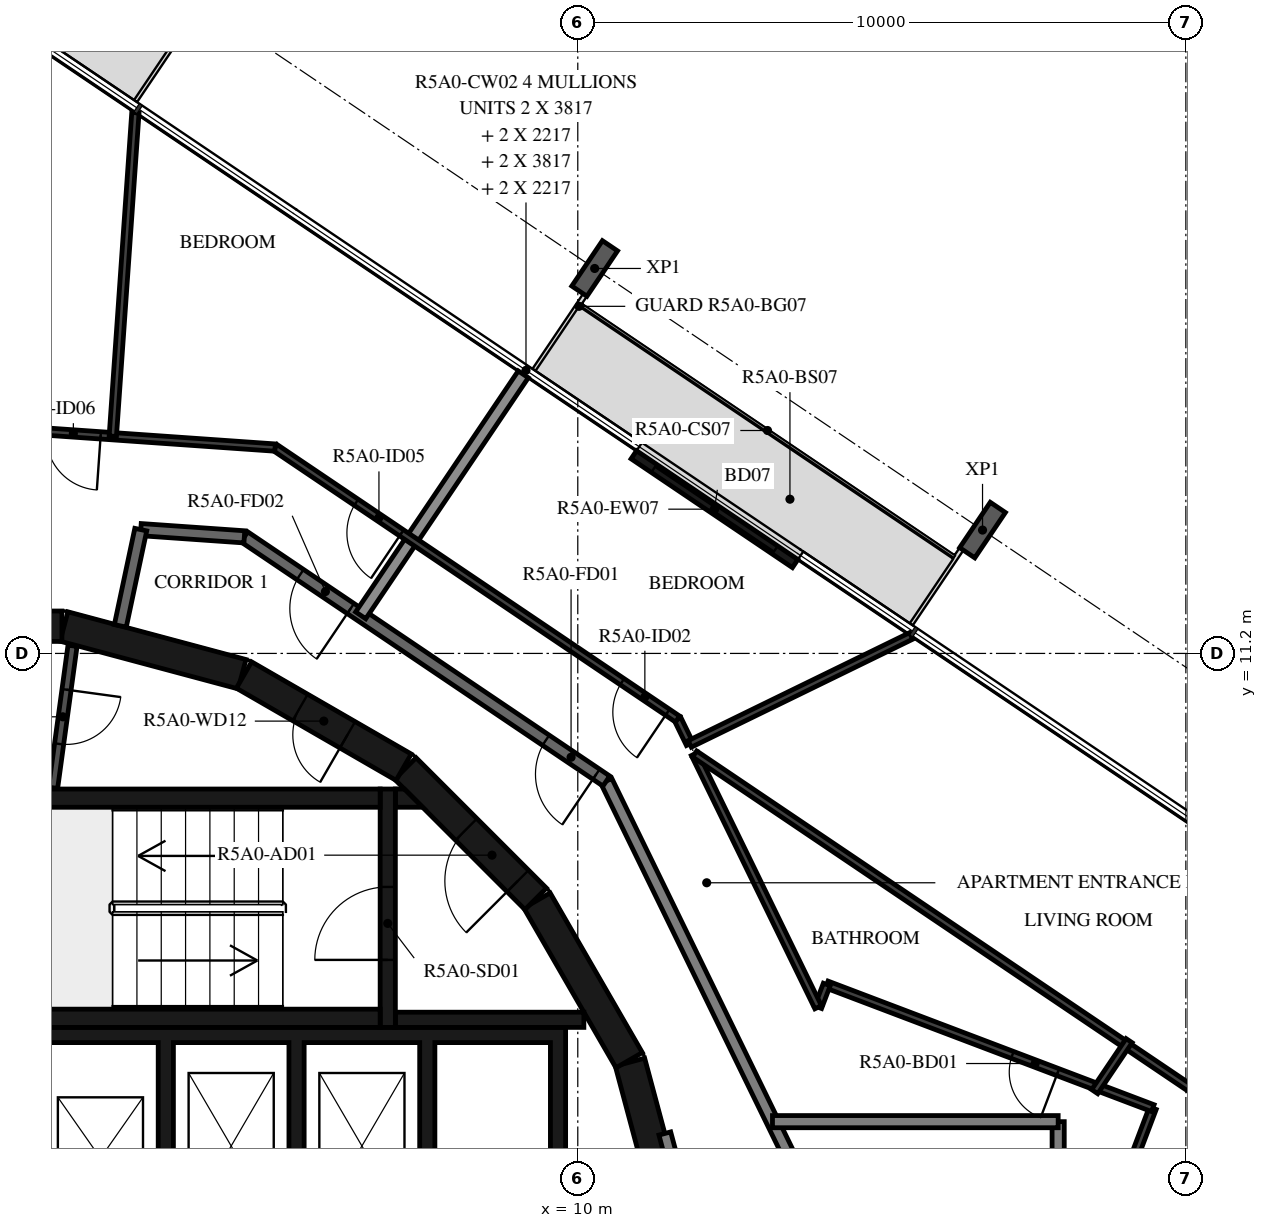
"""IFC4 building model, lengths in metres.
Left out: names, types, materials, properties, quantities, classifications, styles, units other than length and angle.
Written with IfcOpenShell. Run it as: python <this file> out.ifc"""

import sys

from ifc_helpers import new_model, si_unit, direction, frame, frame_2d, origin, origin_2d, place, context, subcontext, project, spatial, polyline, rectangle, i_section, outline, extrude, element, fill, save


model = new_model("IFC4")
c1 = context("Model", 3, precision=1e-05, world=origin(), true_north=direction((0.0, 1.0)))
c2 = subcontext(c1, "Body", "Model", "MODEL_VIEW")
j1 = project(units=[si_unit("LENGTHUNIT", "METRE"), si_unit("PLANEANGLEUNIT", "RADIAN")], contexts=[c1])
p1 = place(None, origin())
s1 = spatial("IfcSite", under=j1, at=p1, CompositionType="ELEMENT")
p2 = place(p1, origin())
s2 = spatial("IfcBuilding", under=s1, at=p2, CompositionType="ELEMENT")
p3 = place(p2, frame((0.0, 0.0, 195.4)))
s3 = spatial("IfcBuildingStorey", under=s2, at=p3, CompositionType="ELEMENT", Elevation=195.4)
for number, where, z_axis, x_axis in (
    (1, (16.656, 13.228, -0.38), (0.0, 0.0, 1.0), (0.829, -0.559, 0.0)),
    (2, (10.278, 17.531, -0.38), (0.0, 0.0, 1.0), (0.829, -0.559, 0.0)),
):
    element("IfcColumn", number, at=place(p3, frame(where, z_axis=z_axis, x_axis=x_axis)), inside=s3, PredefinedType="COLUMN", context=c2, shape_type="SweptSolid", body=[
        extrude(i_section(OverallWidth=0.3, OverallDepth=0.9, WebThickness=0.019, FlangeThickness=0.035, FilletRadius=0.03, at=origin_2d()), origin(), (0.0, 0.0, 1.0), 3.5),
    ])
p4 = place(p3, frame((13.574, 12.677, 0.0), z_axis=(0.0, 0.0, 1.0), x_axis=(-0.829068838882, 0.55914654644, 0.0)))
e3 = element("IfcWall", 3, at=p4, inside=s3, PredefinedType="STANDARD", context=c2, shape_type="SweptSolid", body=[
    extrude(rectangle(XDim=3.2, YDim=0.16, at=frame_2d((1.6, 0.0))), origin(), (0.0, 0.0, 1.0), 3.12),
])
p5 = place(p4, frame((0.4, 0.0, 0.0)))
e4 = element("IfcOpeningElement", 4, at=p5, cuts=e3, PredefinedType="OPENING", context=c2, shape_type="SweptSolid", body=[
    extrude(rectangle(XDim=2.4, YDim=2.4, at=frame_2d((1.2, 1.2))), frame((0.0, 0.09, 0.0), z_axis=(0.0, -1.0, 0.0), x_axis=(1.0, 0.0, 0.0)), (0.0, 0.0, 1.0), 0.18),
])
for number, where, z_axis, x_axis in (
    (5, (11.643, 1.55, 0.0), (0.0, 0.0, 1.0), (-0.259, 0.966, 0.0)),
    (6, (10.845, 4.51, 0.0), (0.0, 0.0, 1.0), (-0.5, 0.866, 0.0)),
):
    element("IfcWall", number, at=place(p3, frame(where, z_axis=z_axis, x_axis=x_axis)), inside=s3, PredefinedType="SHEAR", context=c2, shape_type="SweptSolid", body=[
        extrude(rectangle(XDim=3.033, YDim=0.5, at=frame_2d((1.516, 0.0))), origin(), (0.0, 0.0, 1.0), 3.12),
    ])
p6 = place(p3, frame((9.308, 7.164, 0.0), z_axis=(0.0, 0.0, 1.0), x_axis=(-0.707106781187, 0.707106781187, 0.0)))
e7 = element("IfcWall", 7, at=p6, inside=s3, PredefinedType="SHEAR", context=c2, shape_type="SweptSolid", body=[
    extrude(rectangle(XDim=3.032, YDim=0.5, at=frame_2d((1.516, 0.0))), origin(), (0.0, 0.0, 1.0), 3.12),
])
p7 = place(p6, frame((0.416, 0.0, 0.0)))
e8 = element("IfcOpeningElement", 8, at=p7, cuts=e7, PredefinedType="OPENING", context=c2, shape_type="SweptSolid", body=[
    extrude(rectangle(XDim=1.2, YDim=2.1, at=frame_2d((0.6, 1.05))), frame((0.0, 0.26, 0.0), z_axis=(0.0, -1.0, 0.0), x_axis=(1.0, 0.0, 0.0)), (0.0, 0.0, 1.0), 0.52),
])
p8 = place(p3, frame((7.137, 9.329, 0.0), z_axis=(0.0, 0.0, 1.0), x_axis=(-0.865975092491, 0.500087131594, 0.0)))
e9 = element("IfcWall", 9, at=p8, inside=s3, PredefinedType="SHEAR", context=c2, shape_type="SweptSolid", body=[
    extrude(rectangle(XDim=3.033, YDim=0.5, at=frame_2d((1.516, 0.0))), origin(), (0.0, 0.0, 1.0), 3.12),
])
p9 = place(p8, frame((1.066, 0.0, 0.0)))
e10 = element("IfcOpeningElement", 10, at=p9, cuts=e9, PredefinedType="OPENING", context=c2, shape_type="SweptSolid", body=[
    extrude(rectangle(XDim=0.9, YDim=2.1, at=frame_2d((0.45, 1.05))), frame((0.0, 0.26, 0.0), z_axis=(0.0, -1.0, 0.0), x_axis=(1.0, 0.0, 0.0)), (0.0, 0.0, 1.0), 0.52),
])
for number, where, z_axis, x_axis in (
    (11, (4.479, 10.858, 0.0), (0.0, 0.0, 1.0), (-0.966, 0.259, 0.0)),
    (12, (1.516, 11.647, 0.0), (0.0, 0.0, 1.0), (-1.0, 0.0, 0.0)),
):
    element("IfcWall", number, at=place(p3, frame(where, z_axis=z_axis, x_axis=x_axis)), inside=s3, PredefinedType="SHEAR", context=c2, shape_type="SweptSolid", body=[
        extrude(rectangle(XDim=3.033, YDim=0.5, at=frame_2d((1.516, 0.0))), origin(), (0.0, 0.0, 1.0), 3.12),
    ])
for number, where, z_axis, x_axis in (
    (13, (0.0, 5.2, 0.0), (0.0, 0.0, 1.0), (1.0, 0.0, 0.0)),
    (14, (0.0, 8.82, 0.0), (0.0, 0.0, 1.0), (1.0, 0.0, 0.0)),
):
    element("IfcWall", number, at=place(p3, frame(where, z_axis=z_axis, x_axis=x_axis)), inside=s3, PredefinedType="SHEAR", context=c2, shape_type="SweptSolid", body=[
        extrude(rectangle(XDim=6.75, YDim=0.3, at=frame_2d((3.375, 0.0))), origin(), (0.0, 0.0, 1.0), 3.12),
    ])
p10 = place(p3, frame((6.875, 5.05, 0.0), z_axis=(0.0, 0.0, 1.0), x_axis=(0.0, 1.0, 0.0)))
e15 = element("IfcWall", 15, at=p10, inside=s3, PredefinedType="SHEAR", context=c2, shape_type="SweptSolid", body=[
    extrude(rectangle(XDim=3.92, YDim=0.25, at=frame_2d((1.96, 0.0))), origin(), (0.0, 0.0, 1.0), 3.12),
])
p11 = place(p10, frame((1.11, 0.0, 0.0)))
e16 = element("IfcOpeningElement", 16, at=p11, cuts=e15, PredefinedType="OPENING", context=c2, shape_type="SweptSolid", body=[
    extrude(rectangle(XDim=1.2, YDim=2.1, at=frame_2d((0.6, 1.05))), frame((0.0, 0.135, 0.0), z_axis=(0.0, -1.0, 0.0), x_axis=(1.0, 0.0, 0.0)), (0.0, 0.0, 1.0), 0.27),
])
p12 = place(p3, frame((7.0, 5.175, 0.0), z_axis=(0.0, 0.0, 1.0), x_axis=(1.0, 0.0, 0.0)))
e17 = element("IfcWall", 17, at=p12, inside=s3, PredefinedType="SHEAR", context=c2, shape_type="SweptSolid", body=[
    extrude(rectangle(XDim=3.1, YDim=0.25, at=frame_2d((1.55, 0.0))), origin(), (0.0, 0.0, 1.0), 3.12),
])
p13 = place(p3, origin())
e18 = element("IfcWall", 18, at=p13, inside=s3, PredefinedType="SHEAR", context=c2, shape_type="SweptSolid", body=[
    extrude(outline(polyline([(7.448, 8.67), (7.0, 8.67), (7.0, 8.97), (7.148, 8.97), (7.448, 8.67)])), origin(), (0.0, 0.0, 1.0), 3.12),
])
p14 = place(p3, origin())
e19 = element("IfcWall", 19, at=p14, inside=s3, PredefinedType="SHEAR", context=c2, shape_type="SweptSolid", body=[
    extrude(outline(polyline([(-9.55, 4.8), (-5.5, 4.8), (-5.5, 1.9), (-5.25, 1.9), (-5.25, 4.8), (-1.2, 4.8), (-1.2, 1.9), (-0.95, 1.9), (-0.95, 4.8), (0.95, 4.8), (0.95, 1.9), (1.2, 1.9), (1.2, 4.8), (3.1, 4.8), (3.1, 1.9), (3.35, 1.9), (3.35, 4.8), (5.25, 4.8), (5.25, 1.9), (5.5, 1.9), (5.5, 4.8), (7.4, 4.8), (7.4, 1.9), (7.65, 1.9), (7.65, 4.8), (9.55, 4.8), (9.55, 1.9), (9.8, 1.9), (9.8, 4.8), (9.8, 5.05), (-9.8, 5.05), (-9.8, 4.8), (-9.8, 1.9), (-9.55, 1.9), (-9.55, 4.8)])), origin(), (0.0, 0.0, 1.0), 3.12),
])
p15 = place(p3, frame((1.691, 11.326, 0.0), z_axis=(0.0, 0.0, 1.0), x_axis=(-0.135344253201, -0.990798633994, 0.0)))
e20 = element("IfcWall", 20, at=p15, inside=s3, PredefinedType="PARTITIONING", context=c2, shape_type="SweptSolid", body=[
    extrude(rectangle(XDim=2.358, YDim=0.15, at=frame_2d((1.179, 0.0))), origin(), (0.0, 0.0, 1.0), 3.12),
])
p16 = place(p15, frame((0.729, 0.0, 0.0)))
e21 = element("IfcOpeningElement", 21, at=p16, cuts=e20, PredefinedType="OPENING", context=c2, shape_type="SweptSolid", body=[
    extrude(rectangle(XDim=0.9, YDim=2.1, at=frame_2d((0.45, 1.05))), frame((0.0, 0.085, 0.0), z_axis=(0.0, -1.0, 0.0), x_axis=(1.0, 0.0, 0.0)), (0.0, 0.0, 1.0), 0.17),
])
p17 = place(p3, frame((11.87, 1.668, 0.0), z_axis=(0.0, 0.0, 1.0), x_axis=(-0.258836880648, 0.965921047093, 0.0)))
e22 = element("IfcWall", 22, at=p17, inside=s3, PredefinedType="STANDARD", context=c2, shape_type="SweptSolid", body=[
    extrude(rectangle(XDim=1.695, YDim=0.2, at=frame_2d((0.848, 0.0))), origin(), (0.0, 0.0, 1.0), 3.12),
])
p18 = place(p3, frame((13.618, 2.647, 0.0), z_axis=(0.0, 0.0, 1.0), x_axis=(-0.438366026218, 0.898796543751, 0.0)))
e23 = element("IfcWall", 23, at=p18, inside=s3, PredefinedType="STANDARD", context=c2, shape_type="SweptSolid", body=[
    extrude(rectangle(XDim=7.181, YDim=0.2, at=frame_2d((3.591, 0.0))), origin(), (0.0, 0.0, 1.0), 3.12),
])
p19 = place(p3, frame((10.47, 9.101, 0.0), z_axis=(0.0, 0.0, 1.0), x_axis=(-0.829035841718, 0.559195469534, 0.0)))
e24 = element("IfcWall", 24, at=p19, inside=s3, PredefinedType="STANDARD", context=c2, shape_type="SweptSolid", body=[
    extrude(rectangle(XDim=7.181, YDim=0.2, at=frame_2d((3.591, 0.0))), origin(), (0.0, 0.0, 1.0), 3.12),
])
p20 = place(p19, frame((0.2, 0.0, 0.0)))
e25 = element("IfcOpeningElement", 25, at=p20, cuts=e24, PredefinedType="OPENING", context=c2, shape_type="SweptSolid", body=[
    extrude(rectangle(XDim=1.0, YDim=2.1, at=frame_2d((0.5, 1.05))), frame((0.0, 0.11, 0.0), z_axis=(0.0, -1.0, 0.0), x_axis=(1.0, 0.0, 0.0)), (0.0, 0.0, 1.0), 0.22),
])
p21 = place(p19, frame((5.073, 0.0, 0.0)))
e26 = element("IfcOpeningElement", 26, at=p21, cuts=e24, PredefinedType="OPENING", context=c2, shape_type="SweptSolid", body=[
    extrude(rectangle(XDim=1.0, YDim=2.1, at=frame_2d((0.5, 1.05))), frame((0.0, 0.11, 0.0), z_axis=(0.0, -1.0, 0.0), x_axis=(1.0, 0.0, 0.0)), (0.0, 0.0, 1.0), 0.22),
])
p22 = place(p3, frame((4.517, 13.117, 0.0), z_axis=(0.0, 0.0, 1.0), x_axis=(-0.997562153664, 0.069783591025, 0.0)))
e27 = element("IfcWall", 27, at=p22, inside=s3, PredefinedType="STANDARD", context=c2, shape_type="SweptSolid", body=[
    extrude(rectangle(XDim=1.707, YDim=0.2, at=frame_2d((0.854, 0.0))), origin(), (0.0, 0.0, 1.0), 3.12),
])
p23 = place(p3, frame((2.813, 13.236, 0.0), z_axis=(0.0, 0.0, 1.0), x_axis=(-0.207911086063, -0.978147729278, 0.0)))
e28 = element("IfcWall", 28, at=p23, inside=s3, PredefinedType="STANDARD", context=c2, shape_type="SweptSolid", body=[
    extrude(rectangle(XDim=1.618, YDim=0.2, at=frame_2d((0.809, 0.0))), origin(), (0.0, 0.0, 1.0), 3.12),
])
p24 = place(p3, frame((17.9, -3.5, 0.0), z_axis=(0.0, 0.0, 1.0), x_axis=(0.0, 1.0, 0.0)))
e29 = element("IfcWall", 29, at=p24, inside=s3, PredefinedType="STANDARD", context=c2, shape_type="SweptSolid", body=[
    extrude(rectangle(XDim=7.0, YDim=0.2, at=frame_2d((3.5, 0.0))), origin(), (0.0, 0.0, 1.0), 3.12),
])
p25 = place(p3, frame((17.9, 3.5, 0.0), z_axis=(0.0, 0.0, 1.0), x_axis=(-1.0, 0.0, 0.0)))
e30 = element("IfcWall", 30, at=p25, inside=s3, PredefinedType="STANDARD", context=c2, shape_type="SweptSolid", body=[
    extrude(rectangle(XDim=4.698, YDim=0.2, at=frame_2d((2.349, 0.0))), origin(), (0.0, 0.0, 1.0), 3.12),
])
p26 = place(p3, frame((9.104, 15.79, 0.0), z_axis=(0.0, 0.0, 1.0), x_axis=(-0.559193912135, -0.829036892201, 0.0)))
e31 = element("IfcWall", 31, at=p26, inside=s3, PredefinedType="STANDARD", context=c2, shape_type="SweptSolid", body=[
    extrude(rectangle(XDim=4.781, YDim=0.2, at=frame_2d((2.39, 0.0))), origin(), (0.0, 0.0, 1.0), 2.73),
])
p27 = place(p3, frame((18.286, 0.637, 0.0), z_axis=(0.0, 0.0, 1.0), x_axis=(0.354672075988, 0.934990758518, 0.0)))
e32 = element("IfcWall", 32, at=p27, inside=s3, PredefinedType="PARTITIONING", context=c2, shape_type="SweptSolid", body=[
    extrude(rectangle(XDim=3.3, YDim=0.12, at=frame_2d((1.65, 0.0))), origin(), (0.0, 0.0, 1.0), 3.12),
])
p28 = place(p27, frame((1.2, 0.0, 0.0)))
e33 = element("IfcOpeningElement", 33, at=p28, cuts=e32, PredefinedType="OPENING", context=c2, shape_type="SweptSolid", body=[
    extrude(rectangle(XDim=0.9, YDim=2.1, at=frame_2d((0.45, 1.05))), frame((0.0, 0.07, 0.0), z_axis=(0.0, -1.0, 0.0), x_axis=(1.0, 0.0, 0.0)), (0.0, 0.0, 1.0), 0.14),
])
p29 = place(p3, frame((19.456, 3.722, 0.0), z_axis=(0.0, 0.0, 1.0), x_axis=(-0.935017484321, 0.3546016131, 0.0)))
e34 = element("IfcWall", 34, at=p29, inside=s3, PredefinedType="PARTITIONING", context=c2, shape_type="SweptSolid", body=[
    extrude(rectangle(XDim=5.734, YDim=0.12, at=frame_2d((2.867, 0.0))), origin(), (0.0, 0.0, 1.0), 3.12),
])
p30 = place(p29, frame((1.669, 0.0, 0.0)))
e35 = element("IfcOpeningElement", 35, at=p30, cuts=e34, PredefinedType="OPENING", context=c2, shape_type="SweptSolid", body=[
    extrude(rectangle(XDim=0.8, YDim=2.1, at=frame_2d((0.4, 1.05))), frame((0.0, 0.07, 0.0), z_axis=(0.0, -1.0, 0.0), x_axis=(1.0, 0.0, 0.0)), (0.0, 0.0, 1.0), 0.14),
])
p31 = place(p3, frame((14.094, 5.756, 0.0), z_axis=(0.0, 0.0, 1.0), x_axis=(-0.354267529254, -0.935144116014, 0.0)))
e36 = element("IfcWall", 36, at=p31, inside=s3, PredefinedType="PARTITIONING", context=c2, shape_type="SweptSolid", body=[
    extrude(rectangle(XDim=0.4, YDim=0.12, at=frame_2d((0.2, 0.0))), origin(), (0.0, 0.0, 1.0), 3.12),
])
p32 = place(p3, frame((13.953, 5.382, 0.0), z_axis=(0.0, 0.0, 1.0), x_axis=(-0.438382107355, 0.898788700391, 0.0)))
e37 = element("IfcWall", 37, at=p32, inside=s3, PredefinedType="PARTITIONING", context=c2, shape_type="SweptSolid", body=[
    extrude(rectangle(XDim=4.634, YDim=0.12, at=frame_2d((2.317, 0.0))), origin(), (0.0, 0.0, 1.0), 3.12),
])
p33 = place(p3, frame((11.841, 9.712, 0.0), z_axis=(0.0, 0.0, 1.0), x_axis=(-0.438381293215, 0.898789097486, 0.0)))
e38 = element("IfcWall", 38, at=p33, inside=s3, PredefinedType="PARTITIONING", context=c2, shape_type="SweptSolid", body=[
    extrude(rectangle(XDim=0.454, YDim=0.12, at=frame_2d((0.227, 0.0))), origin(), (0.0, 0.0, 1.0), 3.12),
])
p34 = place(p3, frame((11.642, 10.12, 0.0), z_axis=(0.0, 0.0, 1.0), x_axis=(-0.829032241779, 0.55920080659, 0.0)))
e39 = element("IfcWall", 39, at=p34, inside=s3, PredefinedType="PARTITIONING", context=c2, shape_type="SweptSolid", body=[
    extrude(rectangle(XDim=7.985, YDim=0.12, at=frame_2d((3.992, 0.0))), origin(), (0.0, 0.0, 1.0), 3.12),
])
p35 = place(p34, frame((0.2, 0.0, 0.0)))
e40 = element("IfcOpeningElement", 40, at=p35, cuts=e39, PredefinedType="OPENING", context=c2, shape_type="SweptSolid", body=[
    extrude(rectangle(XDim=0.9, YDim=2.1, at=frame_2d((0.45, 1.05))), frame((0.0, 0.07, 0.0), z_axis=(0.0, -1.0, 0.0), x_axis=(1.0, 0.0, 0.0)), (0.0, 0.0, 1.0), 0.14),
])
p36 = place(p34, frame((5.475, 0.0, 0.0)))
e41 = element("IfcOpeningElement", 41, at=p36, cuts=e39, PredefinedType="OPENING", context=c2, shape_type="SweptSolid", body=[
    extrude(rectangle(XDim=0.9, YDim=2.1, at=frame_2d((0.45, 1.05))), frame((0.0, 0.07, 0.0), z_axis=(0.0, -1.0, 0.0), x_axis=(1.0, 0.0, 0.0)), (0.0, 0.0, 1.0), 0.14),
])
p37 = place(p3, frame((22.598, 2.345, 0.0), z_axis=(0.0, 0.0, 1.0), x_axis=(-0.829034113947, 0.559198031034, 0.0)))
e42 = element("IfcWall", 42, at=p37, inside=s3, PredefinedType="PARTITIONING", context=c2, shape_type="SweptSolid", body=[
    extrude(rectangle(XDim=12.879, YDim=0.12, at=frame_2d((6.439, 0.0))), origin(), (0.0, 0.0, 1.0), 3.12),
])
p38 = place(p37, frame((0.2, 0.0, 0.0)))
e43 = element("IfcOpeningElement", 43, at=p38, cuts=e42, PredefinedType="OPENING", context=c2, shape_type="SweptSolid", body=[
    extrude(rectangle(XDim=0.9, YDim=2.1, at=frame_2d((0.45, 1.05))), frame((0.0, 0.07, 0.0), z_axis=(0.0, -1.0, 0.0), x_axis=(1.0, 0.0, 0.0)), (0.0, 0.0, 1.0), 0.14),
])
p39 = place(p3, frame((19.067, 4.832, 0.0), z_axis=(0.0, 0.0, 1.0), x_axis=(-0.559257363459, -0.828994090098, 0.0)))
e44 = element("IfcWall", 44, at=p39, inside=s3, PredefinedType="PARTITIONING", context=c2, shape_type="SweptSolid", body=[
    extrude(rectangle(XDim=1.012, YDim=0.12, at=frame_2d((0.506, 0.0))), origin(), (0.0, 0.0, 1.0), 3.12),
])
p40 = place(p3, frame((15.482, 11.487, 0.0), z_axis=(0.0, 0.0, 1.0), x_axis=(-0.898807251285, -0.438344071521, 0.0)))
e45 = element("IfcWall", 45, at=p40, inside=s3, PredefinedType="PARTITIONING", context=c2, shape_type="SweptSolid", body=[
    extrude(rectangle(XDim=4.051, YDim=0.12, at=frame_2d((2.025, 0.0))), origin(), (0.0, 0.0, 1.0), 3.12),
])
p41 = place(p3, frame((5.022, 14.585, 0.0), z_axis=(0.0, 0.0, 1.0), x_axis=(-0.997565118395, 0.069741197017, 0.0)))
e46 = element("IfcWall", 46, at=p41, inside=s3, PredefinedType="PARTITIONING", context=c2, shape_type="SweptSolid", body=[
    extrude(rectangle(XDim=7.985, YDim=0.12, at=frame_2d((3.993, 0.0))), origin(), (0.0, 0.0, 1.0), 3.12),
])
p42 = place(p41, frame((2.875, 0.0, 0.0)))
e47 = element("IfcOpeningElement", 47, at=p42, cuts=e46, PredefinedType="OPENING", context=c2, shape_type="SweptSolid", body=[
    extrude(rectangle(XDim=0.9, YDim=2.1, at=frame_2d((0.45, 1.05))), frame((0.0, 0.07, 0.0), z_axis=(0.0, -1.0, 0.0), x_axis=(1.0, 0.0, 0.0)), (0.0, 0.0, 1.0), 0.14),
])
p43 = place(p41, frame((6.938, 0.0, 0.0)))
e48 = element("IfcOpeningElement", 48, at=p43, cuts=e46, PredefinedType="OPENING", context=c2, shape_type="SweptSolid", body=[
    extrude(rectangle(XDim=0.8, YDim=2.1, at=frame_2d((0.4, 1.05))), frame((0.0, 0.07, 0.0), z_axis=(0.0, -1.0, 0.0), x_axis=(1.0, 0.0, 0.0)), (0.0, 0.0, 1.0), 0.14),
])
p44 = place(p3, frame((2.725, 20.092, 0.0), z_axis=(0.0, 0.0, 1.0), x_axis=(-0.069766716578, -0.997563333958, 0.0)))
e49 = element("IfcWall", 49, at=p44, inside=s3, PredefinedType="PARTITIONING", context=c2, shape_type="SweptSolid", body=[
    extrude(rectangle(XDim=5.333, YDim=0.12, at=frame_2d((2.667, 0.0))), origin(), (0.0, 0.0, 1.0), 3.12),
])
p45 = place(p5, origin())
e50 = element("IfcDoor", 50, at=p45, inside=s3, OperationType="DOUBLE_DOOR_SLIDING", PredefinedType="DOOR", context=c2, shape_type="SweptSolid", body=[
    extrude(rectangle(XDim=2.4, YDim=2.4, at=frame_2d((1.2, 1.2))), frame((0.0, 0.025, 0.0), z_axis=(0.0, -1.0, 0.0), x_axis=(1.0, 0.0, 0.0)), (0.0, 0.0, 1.0), 0.05),
])
fill(e4, e50)
p46 = place(p11, origin())
e51 = element("IfcDoor", 51, at=p46, inside=s3, OperationType="SINGLE_SWING_LEFT", PredefinedType="DOOR", context=c2, shape_type="SweptSolid", body=[
    extrude(rectangle(XDim=1.2, YDim=2.1, at=frame_2d((0.6, 1.05))), frame((0.0, 0.025, 0.0), z_axis=(0.0, -1.0, 0.0), x_axis=(1.0, 0.0, 0.0)), (0.0, 0.0, 1.0), 0.05),
])
fill(e16, e51)
p47 = place(p7, origin())
e52 = element("IfcDoor", 52, at=p47, inside=s3, OperationType="SINGLE_SWING_RIGHT", PredefinedType="DOOR", context=c2, shape_type="SweptSolid", body=[
    extrude(rectangle(XDim=1.2, YDim=2.1, at=frame_2d((0.6, 1.05))), frame((0.0, 0.025, 0.0), z_axis=(0.0, -1.0, 0.0), x_axis=(1.0, 0.0, 0.0)), (0.0, 0.0, 1.0), 0.05),
])
fill(e8, e52)
p48 = place(p16, origin())
e53 = element("IfcDoor", 53, at=p48, inside=s3, OperationType="SINGLE_SWING_RIGHT", PredefinedType="DOOR", context=c2, shape_type="SweptSolid", body=[
    extrude(rectangle(XDim=0.9, YDim=2.1, at=frame_2d((0.45, 1.05))), frame((0.0, 0.025, 0.0), z_axis=(0.0, -1.0, 0.0), x_axis=(1.0, 0.0, 0.0)), (0.0, 0.0, 1.0), 0.05),
])
fill(e21, e53)
p49 = place(p9, origin())
e54 = element("IfcDoor", 54, at=p49, inside=s3, OperationType="SINGLE_SWING_RIGHT", PredefinedType="DOOR", context=c2, shape_type="SweptSolid", body=[
    extrude(rectangle(XDim=0.9, YDim=2.1, at=frame_2d((0.45, 1.05))), frame((0.0, 0.025, 0.0), z_axis=(0.0, -1.0, 0.0), x_axis=(1.0, 0.0, 0.0)), (0.0, 0.0, 1.0), 0.05),
])
fill(e10, e54)
p50 = place(p20, origin())
e55 = element("IfcDoor", 55, at=p50, inside=s3, OperationType="SINGLE_SWING_LEFT", PredefinedType="DOOR", context=c2, shape_type="SweptSolid", body=[
    extrude(rectangle(XDim=1.0, YDim=2.1, at=frame_2d((0.5, 1.05))), frame((0.0, 0.025, 0.0), z_axis=(0.0, -1.0, 0.0), x_axis=(1.0, 0.0, 0.0)), (0.0, 0.0, 1.0), 0.05),
])
fill(e25, e55)
p51 = place(p30, origin())
e56 = element("IfcDoor", 56, at=p51, inside=s3, OperationType="SINGLE_SWING_LEFT", PredefinedType="DOOR", context=c2, shape_type="SweptSolid", body=[
    extrude(rectangle(XDim=0.8, YDim=2.1, at=frame_2d((0.4, 1.05))), frame((0.0, 0.025, 0.0), z_axis=(0.0, -1.0, 0.0), x_axis=(1.0, 0.0, 0.0)), (0.0, 0.0, 1.0), 0.05),
])
fill(e35, e56)
p52 = place(p35, origin())
e57 = element("IfcDoor", 57, at=p52, inside=s3, OperationType="SINGLE_SWING_LEFT", PredefinedType="DOOR", context=c2, shape_type="SweptSolid", body=[
    extrude(rectangle(XDim=0.9, YDim=2.1, at=frame_2d((0.45, 1.05))), frame((0.0, 0.025, 0.0), z_axis=(0.0, -1.0, 0.0), x_axis=(1.0, 0.0, 0.0)), (0.0, 0.0, 1.0), 0.05),
])
fill(e40, e57)
p53 = place(p21, origin())
e58 = element("IfcDoor", 58, at=p53, inside=s3, OperationType="SINGLE_SWING_RIGHT", PredefinedType="DOOR", context=c2, shape_type="SweptSolid", body=[
    extrude(rectangle(XDim=1.0, YDim=2.1, at=frame_2d((0.5, 1.05))), frame((0.0, 0.025, 0.0), z_axis=(0.0, -1.0, 0.0), x_axis=(1.0, 0.0, 0.0)), (0.0, 0.0, 1.0), 0.05),
])
fill(e26, e58)
p54 = place(p36, origin())
e59 = element("IfcDoor", 59, at=p54, inside=s3, OperationType="SINGLE_SWING_RIGHT", PredefinedType="DOOR", context=c2, shape_type="SweptSolid", body=[
    extrude(rectangle(XDim=0.9, YDim=2.1, at=frame_2d((0.45, 1.05))), frame((0.0, 0.025, 0.0), z_axis=(0.0, -1.0, 0.0), x_axis=(1.0, 0.0, 0.0)), (0.0, 0.0, 1.0), 0.05),
])
fill(e41, e59)
p55 = place(p42, origin())
e60 = element("IfcDoor", 60, at=p55, inside=s3, OperationType="SINGLE_SWING_RIGHT", PredefinedType="DOOR", context=c2, shape_type="SweptSolid", body=[
    extrude(rectangle(XDim=0.9, YDim=2.1, at=frame_2d((0.45, 1.05))), frame((0.0, 0.025, 0.0), z_axis=(0.0, -1.0, 0.0), x_axis=(1.0, 0.0, 0.0)), (0.0, 0.0, 1.0), 0.05),
])
fill(e47, e60)
save(model, sys.argv[1])
